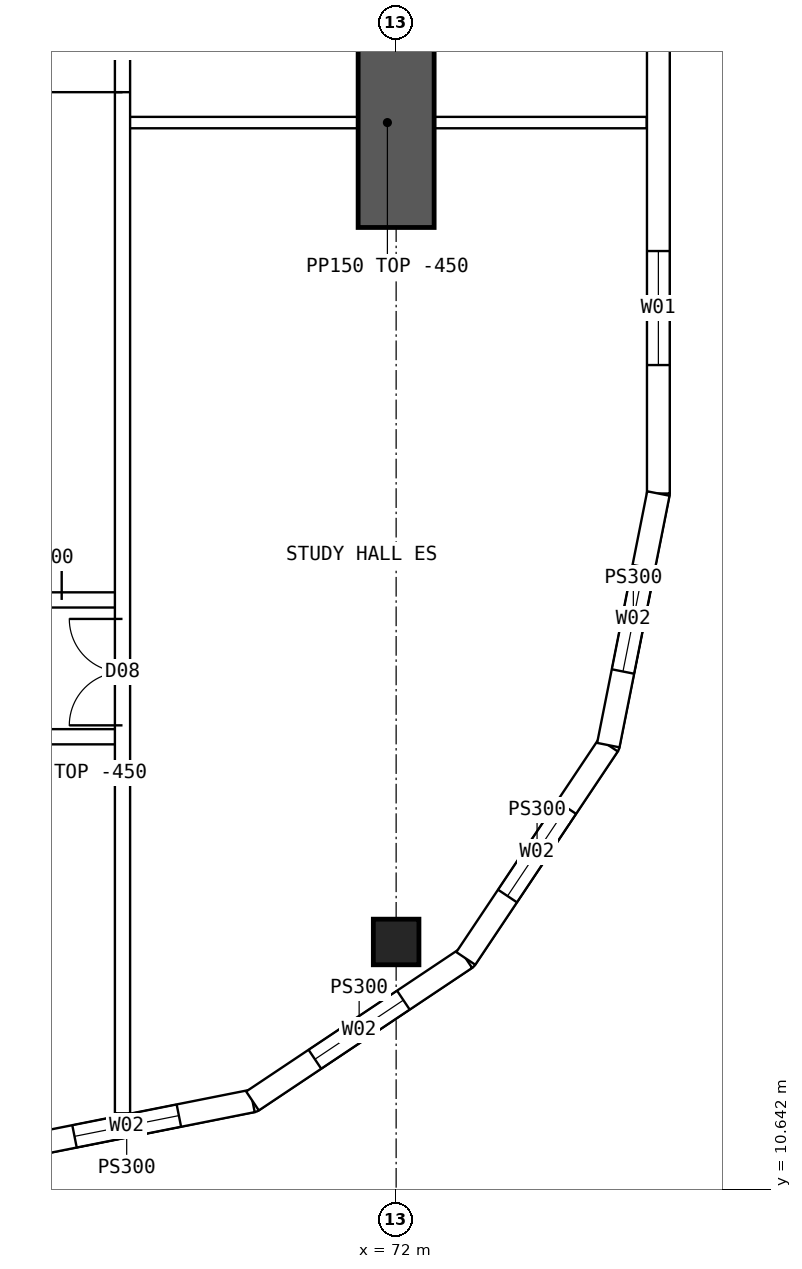
"""IFC4 building model, lengths in metres.
Left out: names, types, materials, properties, quantities, classifications, styles, units other than length and angle.
Written with IfcOpenShell. Run it as: python <this file> out.ifc"""

import sys

from ifc_helpers import new_model, si_unit, direction, frame, frame_2d, origin, origin_2d, place, context, subcontext, project, spatial, polyline, rectangle, hollow_rectangle, outline, extrude, element, fill, save


model = new_model("IFC4")
c1 = context("Model", 3, precision=1e-05, world=origin(), true_north=direction((0.0, 1.0)))
c2 = subcontext(c1, "Body", "Model", "MODEL_VIEW")
j1 = project(units=[si_unit("LENGTHUNIT", "METRE"), si_unit("PLANEANGLEUNIT", "RADIAN")], contexts=[c1])
p1 = place(None, origin())
s1 = spatial("IfcSite", under=j1, at=p1, CompositionType="ELEMENT")
p2 = place(p1, origin())
s2 = spatial("IfcBuilding", under=s1, at=p2, CompositionType="ELEMENT")
p3 = place(p2, frame((0.0, 0.0, 227.8)))
s3 = spatial("IfcBuildingStorey", under=s2, at=p3, CompositionType="ELEMENT", Elevation=227.8)
p4 = place(p3, frame((72.0, 13.9, 0.0), z_axis=(0.0, 0.0, 1.0), x_axis=(1.0, 0.0, 0.0)))
e1 = element("IfcColumn", 1, at=p4, inside=s3, PredefinedType="COLUMN", context=c2, shape_type="SweptSolid", body=[
    extrude(hollow_rectangle(XDim=0.6, YDim=0.6, WallThickness=0.06, at=origin_2d()), origin(), (0.0, 0.0, 1.0), 3.75),
])
p5 = place(p3, frame((72.0, 23.3, 0.0), z_axis=(0.0, 0.0, 1.0), x_axis=(0.0, 1.0, 0.0)))
e2 = element("IfcWall", 2, at=p5, inside=s3, PredefinedType="SHEAR", context=c2, shape_type="SweptSolid", body=[
    extrude(rectangle(XDim=5.0, YDim=1.0, at=frame_2d((2.5, 0.0))), origin(), (0.0, 0.0, 1.0), 3.75),
])
p6 = place(p3, frame((75.45, 19.8, 0.0), z_axis=(0.0, 0.0, 1.0), x_axis=(0.0, 1.0, 0.0)))
e3 = element("IfcWall", 3, at=p6, inside=s3, PredefinedType="SOLIDWALL", context=c2, shape_type="SweptSolid", body=[
    extrude(outline(polyline([(-0.015, -0.15), (24.415, -0.15), (24.385, 0.15), (0.015, 0.15), (-0.015, -0.15)])), origin(), (0.0, 0.0, 1.0), 3.3),
])
p7 = place(p6, frame((1.69, 0.0, 0.9)))
e4 = element("IfcOpeningElement", 4, at=p7, cuts=e3, PredefinedType="OPENING", context=c2, shape_type="SweptSolid", body=[
    extrude(rectangle(XDim=1.5, YDim=2.0, at=frame_2d((0.75, 1.0))), frame((0.0, 0.16, 0.0), z_axis=(0.0, -1.0, 0.0), x_axis=(1.0, 0.0, 0.0)), (0.0, 0.0, 1.0), 0.32),
])
p8 = place(p6, frame((6.57, 0.0, 0.9)))
e5 = element("IfcOpeningElement", 5, at=p8, cuts=e3, PredefinedType="OPENING", context=c2, shape_type="SweptSolid", body=[
    extrude(rectangle(XDim=1.5, YDim=2.0, at=frame_2d((0.75, 1.0))), frame((0.0, 0.16, 0.0), z_axis=(0.0, -1.0, 0.0), x_axis=(1.0, 0.0, 0.0)), (0.0, 0.0, 1.0), 0.32),
])
p9 = place(p6, frame((11.45, 0.0, 0.9)))
e6 = element("IfcOpeningElement", 6, at=p9, cuts=e3, PredefinedType="OPENING", context=c2, shape_type="SweptSolid", body=[
    extrude(rectangle(XDim=1.5, YDim=2.0, at=frame_2d((0.75, 1.0))), frame((0.0, 0.16, 0.0), z_axis=(0.0, -1.0, 0.0), x_axis=(1.0, 0.0, 0.0)), (0.0, 0.0, 1.0), 0.32),
])
p10 = place(p6, frame((16.33, 0.0, 0.9)))
e7 = element("IfcOpeningElement", 7, at=p10, cuts=e3, PredefinedType="OPENING", context=c2, shape_type="SweptSolid", body=[
    extrude(rectangle(XDim=1.5, YDim=2.0, at=frame_2d((0.75, 1.0))), frame((0.0, 0.16, 0.0), z_axis=(0.0, -1.0, 0.0), x_axis=(1.0, 0.0, 0.0)), (0.0, 0.0, 1.0), 0.32),
])
p11 = place(p6, frame((21.21, 0.0, 0.9)))
e8 = element("IfcOpeningElement", 8, at=p11, cuts=e3, PredefinedType="OPENING", context=c2, shape_type="SweptSolid", body=[
    extrude(rectangle(XDim=1.5, YDim=2.0, at=frame_2d((0.75, 1.0))), frame((0.0, 0.16, 0.0), z_axis=(0.0, -1.0, 0.0), x_axis=(1.0, 0.0, 0.0)), (0.0, 0.0, 1.0), 0.32),
])
p12 = place(p3, frame((66.8, 11.15, 0.0), z_axis=(0.0, 0.0, 1.0), x_axis=(0.98078325777, 0.195100490205, 0.0)))
e9 = element("IfcWall", 9, at=p12, inside=s3, PredefinedType="SOLIDWALL", context=c2, shape_type="SweptSolid", body=[
    extrude(outline(polyline([(-0.03, -0.15), (3.405, -0.15), (3.345, 0.15), (0.03, 0.15), (-0.03, -0.15)])), origin(), (0.0, 0.0, 1.0), 3.3),
])
p13 = place(p12, frame((0.988, 0.0, 0.9)))
e10 = element("IfcOpeningElement", 10, at=p13, cuts=e9, PredefinedType="OPENING", context=c2, shape_type="SweptSolid", body=[
    extrude(rectangle(XDim=1.4, YDim=1.8, at=frame_2d((0.7, 0.9))), frame((0.0, 0.16, 0.0), z_axis=(0.0, -1.0, 0.0), x_axis=(1.0, 0.0, 0.0)), (0.0, 0.0, 1.0), 0.32),
])
p14 = place(p3, frame((70.11, 11.808, 0.0), z_axis=(0.0, 0.0, 1.0), x_axis=(0.831460037396, 0.555584562613, 0.0)))
e11 = element("IfcWall", 11, at=p14, inside=s3, PredefinedType="SOLIDWALL", context=c2, shape_type="SweptSolid", body=[
    extrude(outline(polyline([(-0.03, -0.15), (3.405, -0.15), (3.345, 0.15), (0.03, 0.15), (-0.03, -0.15)])), origin(), (0.0, 0.0, 1.0), 3.3),
])
p15 = place(p14, frame((0.988, 0.0, 0.9)))
e12 = element("IfcOpeningElement", 12, at=p15, cuts=e11, PredefinedType="OPENING", context=c2, shape_type="SweptSolid", body=[
    extrude(rectangle(XDim=1.4, YDim=1.8, at=frame_2d((0.7, 0.9))), frame((0.0, 0.16, 0.0), z_axis=(0.0, -1.0, 0.0), x_axis=(1.0, 0.0, 0.0)), (0.0, 0.0, 1.0), 0.32),
])
p16 = place(p3, frame((72.917, 13.684, 0.0), z_axis=(0.0, 0.0, 1.0), x_axis=(0.555567969291, 0.831471124873, 0.0)))
e13 = element("IfcWall", 13, at=p16, inside=s3, PredefinedType="SOLIDWALL", context=c2, shape_type="SweptSolid", body=[
    extrude(outline(polyline([(-0.03, -0.15), (3.405, -0.15), (3.345, 0.15), (0.03, 0.15), (-0.03, -0.15)])), origin(), (0.0, 0.0, 1.0), 3.3),
])
p17 = place(p16, frame((0.988, 0.0, 0.9)))
e14 = element("IfcOpeningElement", 14, at=p17, cuts=e13, PredefinedType="OPENING", context=c2, shape_type="SweptSolid", body=[
    extrude(rectangle(XDim=1.4, YDim=1.8, at=frame_2d((0.7, 0.9))), frame((0.0, 0.16, 0.0), z_axis=(0.0, -1.0, 0.0), x_axis=(1.0, 0.0, 0.0)), (0.0, 0.0, 1.0), 0.32),
])
p18 = place(p3, frame((74.792, 16.49, 0.0), z_axis=(0.0, 0.0, 1.0), x_axis=(0.19508664885, 0.980786011034, 0.0)))
e15 = element("IfcWall", 15, at=p18, inside=s3, PredefinedType="SOLIDWALL", context=c2, shape_type="SweptSolid", body=[
    extrude(outline(polyline([(-0.03, -0.15), (3.39, -0.15), (3.36, 0.15), (0.03, 0.15), (-0.03, -0.15)])), origin(), (0.0, 0.0, 1.0), 3.3),
])
p19 = place(p18, frame((0.988, 0.0, 0.9)))
e16 = element("IfcOpeningElement", 16, at=p19, cuts=e15, PredefinedType="OPENING", context=c2, shape_type="SweptSolid", body=[
    extrude(rectangle(XDim=1.4, YDim=1.8, at=frame_2d((0.7, 0.9))), frame((0.0, 0.16, 0.0), z_axis=(0.0, -1.0, 0.0), x_axis=(1.0, 0.0, 0.0)), (0.0, 0.0, 1.0), 0.32),
])
p20 = place(p3, frame((66.35, 16.6, 0.0), z_axis=(0.0, 0.0, 1.0), x_axis=(1.0, 0.0, 0.0)))
e17 = element("IfcWall", 17, at=p20, inside=s3, PredefinedType="SOLIDWALL", context=c2, shape_type="SweptSolid", body=[
    extrude(rectangle(XDim=2.05, YDim=0.2, at=frame_2d((1.025, 0.0))), origin(), (0.0, 0.0, 1.0), 3.3),
])
p21 = place(p20, frame((0.2, 0.0, 0.0)))
e18 = element("IfcOpeningElement", 18, at=p21, cuts=e17, PredefinedType="OPENING", context=c2, shape_type="SweptSolid", body=[
    extrude(rectangle(XDim=0.9, YDim=2.1, at=frame_2d((0.45, 1.05))), frame((0.0, 0.11, 0.0), z_axis=(0.0, -1.0, 0.0), x_axis=(1.0, 0.0, 0.0)), (0.0, 0.0, 1.0), 0.22),
])
p22 = place(p3, frame((66.35, 18.4, 0.0), z_axis=(0.0, 0.0, 1.0), x_axis=(1.0, 0.0, 0.0)))
e19 = element("IfcWall", 19, at=p22, inside=s3, PredefinedType="SOLIDWALL", context=c2, shape_type="SweptSolid", body=[
    extrude(rectangle(XDim=2.05, YDim=0.2, at=frame_2d((1.025, 0.0))), origin(), (0.0, 0.0, 1.0), 3.3),
])
p23 = place(p22, frame((0.05, 0.0, 0.0)))
e20 = element("IfcOpeningElement", 20, at=p23, cuts=e19, PredefinedType="OPENING", context=c2, shape_type="SweptSolid", body=[
    extrude(rectangle(XDim=1.2, YDim=2.1, at=frame_2d((0.6, 1.05))), frame((0.0, 0.11, 0.0), z_axis=(0.0, -1.0, 0.0), x_axis=(1.0, 0.0, 0.0)), (0.0, 0.0, 1.0), 0.22),
])
p24 = place(p3, frame((68.4, 11.646, 0.0), z_axis=(0.0, 0.0, 1.0), x_axis=(0.0, 1.0, 0.0)))
e21 = element("IfcWall", 21, at=p24, inside=s3, PredefinedType="SOLIDWALL", context=c2, shape_type="SweptSolid", body=[
    extrude(rectangle(XDim=40.708, YDim=0.2, at=frame_2d((20.354, 0.0))), origin(), (0.0, 0.0, 1.0), 3.3),
])
p25 = place(p24, frame((13.434, 0.0, 0.0)))
e22 = element("IfcOpeningElement", 22, at=p25, cuts=e21, PredefinedType="OPENING", context=c2, shape_type="SweptSolid", body=[
    extrude(rectangle(XDim=1.2, YDim=2.1, at=frame_2d((0.6, 1.05))), frame((0.0, 0.11, 0.0), z_axis=(0.0, -1.0, 0.0), x_axis=(1.0, 0.0, 0.0)), (0.0, 0.0, 1.0), 0.22),
])
p26 = place(p24, frame((21.194, 0.0, 0.0)))
e23 = element("IfcOpeningElement", 23, at=p26, cuts=e21, PredefinedType="OPENING", context=c2, shape_type="SweptSolid", body=[
    extrude(rectangle(XDim=1.2, YDim=2.1, at=frame_2d((0.6, 1.05))), frame((0.0, 0.11, 0.0), z_axis=(0.0, -1.0, 0.0), x_axis=(1.0, 0.0, 0.0)), (0.0, 0.0, 1.0), 0.22),
])
p27 = place(p24, frame((5.104, 0.0, 0.0)))
e24 = element("IfcOpeningElement", 24, at=p27, cuts=e21, PredefinedType="OPENING", context=c2, shape_type="SweptSolid", body=[
    extrude(rectangle(XDim=1.4, YDim=2.1, at=frame_2d((0.7, 1.05))), frame((0.0, 0.11, 0.0), z_axis=(0.0, -1.0, 0.0), x_axis=(1.0, 0.0, 0.0)), (0.0, 0.0, 1.0), 0.22),
])
p28 = place(p24, frame((34.104, 0.0, 0.0)))
e25 = element("IfcOpeningElement", 25, at=p28, cuts=e21, PredefinedType="OPENING", context=c2, shape_type="SweptSolid", body=[
    extrude(rectangle(XDim=1.4, YDim=2.1, at=frame_2d((0.7, 1.05))), frame((0.0, 0.11, 0.0), z_axis=(0.0, -1.0, 0.0), x_axis=(1.0, 0.0, 0.0)), (0.0, 0.0, 1.0), 0.22),
])
p29 = place(p3, frame((68.475, 24.68, 0.0), z_axis=(0.0, 0.0, 1.0), x_axis=(1.0, 0.0, 0.0)))
e26 = element("IfcWall", 26, at=p29, inside=s3, PredefinedType="PARTITIONING", context=c2, shape_type="SweptSolid", body=[
    extrude(rectangle(XDim=6.82, YDim=0.15, at=frame_2d((3.41, 0.0))), origin(), (0.0, 0.0, 1.0), 3.3),
])
p30 = place(p7, origin())
e27 = element("IfcWindow", 27, at=p30, inside=s3, PartitioningType="SINGLE_PANEL", PredefinedType="WINDOW", context=c2, shape_type="SweptSolid", body=[
    extrude(rectangle(XDim=1.5, YDim=2.0, at=frame_2d((0.75, 1.0))), frame((0.0, 0.03, 0.0), z_axis=(0.0, -1.0, 0.0), x_axis=(1.0, 0.0, 0.0)), (0.0, 0.0, 1.0), 0.06),
])
fill(e4, e27)
p31 = place(p13, origin())
e28 = element("IfcWindow", 28, at=p31, inside=s3, PartitioningType="SINGLE_PANEL", PredefinedType="WINDOW", context=c2, shape_type="SweptSolid", body=[
    extrude(rectangle(XDim=1.4, YDim=1.8, at=frame_2d((0.7, 0.9))), frame((0.0, 0.03, 0.0), z_axis=(0.0, -1.0, 0.0), x_axis=(1.0, 0.0, 0.0)), (0.0, 0.0, 1.0), 0.06),
])
fill(e10, e28)
p32 = place(p15, origin())
e29 = element("IfcWindow", 29, at=p32, inside=s3, PartitioningType="SINGLE_PANEL", PredefinedType="WINDOW", context=c2, shape_type="SweptSolid", body=[
    extrude(rectangle(XDim=1.4, YDim=1.8, at=frame_2d((0.7, 0.9))), frame((0.0, 0.03, 0.0), z_axis=(0.0, -1.0, 0.0), x_axis=(1.0, 0.0, 0.0)), (0.0, 0.0, 1.0), 0.06),
])
fill(e12, e29)
p33 = place(p17, origin())
e30 = element("IfcWindow", 30, at=p33, inside=s3, PartitioningType="SINGLE_PANEL", PredefinedType="WINDOW", context=c2, shape_type="SweptSolid", body=[
    extrude(rectangle(XDim=1.4, YDim=1.8, at=frame_2d((0.7, 0.9))), frame((0.0, 0.03, 0.0), z_axis=(0.0, -1.0, 0.0), x_axis=(1.0, 0.0, 0.0)), (0.0, 0.0, 1.0), 0.06),
])
fill(e14, e30)
p34 = place(p19, origin())
e31 = element("IfcWindow", 31, at=p34, inside=s3, PartitioningType="SINGLE_PANEL", PredefinedType="WINDOW", context=c2, shape_type="SweptSolid", body=[
    extrude(rectangle(XDim=1.4, YDim=1.8, at=frame_2d((0.7, 0.9))), frame((0.0, 0.03, 0.0), z_axis=(0.0, -1.0, 0.0), x_axis=(1.0, 0.0, 0.0)), (0.0, 0.0, 1.0), 0.06),
])
fill(e16, e31)
p35 = place(p23, origin())
e32 = element("IfcDoor", 32, at=p35, inside=s3, OperationType="DOUBLE_DOOR_SINGLE_SWING", PredefinedType="DOOR", context=c2, shape_type="SweptSolid", body=[
    extrude(rectangle(XDim=1.2, YDim=2.1, at=frame_2d((0.6, 1.05))), frame((0.0, 0.025, 0.0), z_axis=(0.0, -1.0, 0.0), x_axis=(1.0, 0.0, 0.0)), (0.0, 0.0, 1.0), 0.05),
])
fill(e20, e32)
p36 = place(p25, origin())
e33 = element("IfcDoor", 33, at=p36, inside=s3, OperationType="SINGLE_SWING_LEFT", PredefinedType="DOOR", context=c2, shape_type="SweptSolid", body=[
    extrude(rectangle(XDim=1.2, YDim=2.1, at=frame_2d((0.6, 1.05))), frame((0.0, 0.025, 0.0), z_axis=(0.0, -1.0, 0.0), x_axis=(1.0, 0.0, 0.0)), (0.0, 0.0, 1.0), 0.05),
])
fill(e22, e33)
p37 = place(p27, origin())
e34 = element("IfcDoor", 34, at=p37, inside=s3, OperationType="DOUBLE_DOOR_SINGLE_SWING", PredefinedType="DOOR", context=c2, shape_type="SweptSolid", body=[
    extrude(rectangle(XDim=1.4, YDim=2.1, at=frame_2d((0.7, 1.05))), frame((0.0, 0.025, 0.0), z_axis=(0.0, -1.0, 0.0), x_axis=(1.0, 0.0, 0.0)), (0.0, 0.0, 1.0), 0.05),
])
fill(e24, e34)
save(model, sys.argv[1])
